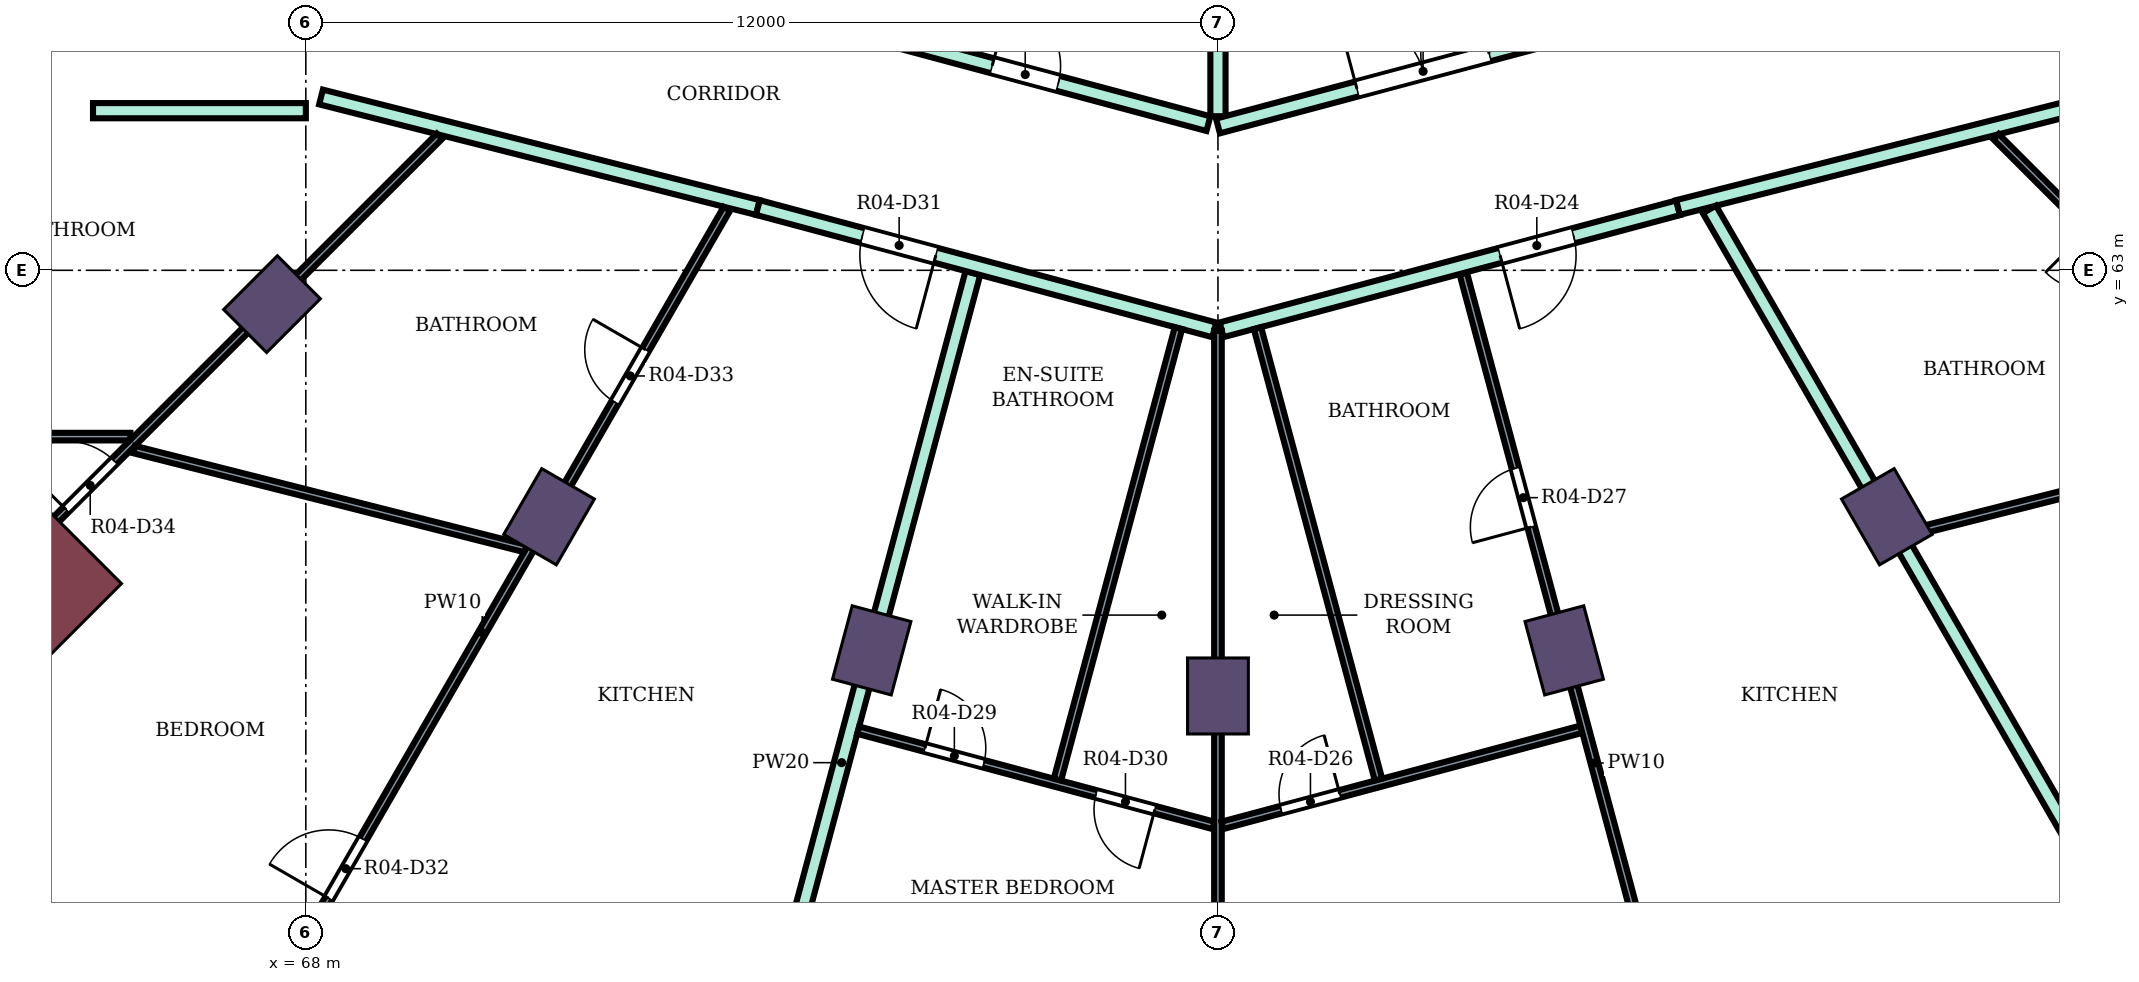
"""IFC4 building model, lengths in metres.
Left out: names, types, materials, properties, quantities, classifications, styles, units other than length and angle.
Written with IfcOpenShell. Run it as: python <this file> out.ifc"""

import sys

from ifc_helpers import new_model, si_unit, direction, frame, frame_2d, origin, origin_2d, place, context, subcontext, project, spatial, rectangle, extrude, element, fill, save


model = new_model("IFC4")
c1 = context("Model", 3, precision=1e-05, world=origin(), true_north=direction((0.0, 1.0)))
c2 = subcontext(c1, "Body", "Model", "MODEL_VIEW")
j1 = project(units=[si_unit("LENGTHUNIT", "METRE"), si_unit("PLANEANGLEUNIT", "RADIAN")], contexts=[c1])
p1 = place(None, origin())
s1 = spatial("IfcSite", under=j1, at=p1, CompositionType="ELEMENT")
p2 = place(p1, origin())
s2 = spatial("IfcBuilding", under=s1, at=p2, CompositionType="ELEMENT")
p3 = place(p2, frame((0.0, 0.0, 198.7)))
s3 = spatial("IfcBuildingStorey", under=s2, at=p3, CompositionType="ELEMENT", Elevation=198.7)
for number, where, z_axis, x_axis in (
    (1, (67.555, 62.555, 0.0), (0.0, 0.0, 1.0), (-0.707, -0.707, 0.0)),
    (2, (71.2, 59.758, 0.0), (0.0, 0.0, 1.0), (-0.5, -0.866, 0.0)),
    (3, (75.445, 58.0, 0.0), (0.0, 0.0, 1.0), (-0.259, -0.966, 0.0)),
    (4, (80.0, 57.4, 0.0), (0.0, 0.0, 1.0), (0.0, -1.0, 0.0)),
    (5, (84.555, 58.0, 0.0), (0.0, 0.0, 1.0), (0.259, -0.966, 0.0)),
    (6, (88.8, 59.758, 0.0), (0.0, 0.0, 1.0), (0.5, -0.866, 0.0)),
):
    element("IfcColumn", number, at=place(p3, frame(where, z_axis=z_axis, x_axis=x_axis)), inside=s3, PredefinedType="COLUMN", context=c2, shape_type="SweptSolid", body=[
        extrude(rectangle(XDim=1.0, YDim=0.8, at=origin_2d()), origin(), (0.0, 0.0, 1.0), 4.1),
    ])
p4 = place(p3, frame((64.09, 59.09, 0.0), z_axis=(0.0, 0.0, 1.0), x_axis=(-0.707106781187, -0.707106781187, 0.0)))
e7 = element("IfcColumn", 7, at=p4, inside=s3, PredefinedType="COLUMN", context=c2, shape_type="SweptSolid", body=[
    extrude(rectangle(XDim=1.8, YDim=2.4, at=origin_2d()), origin(), (0.0, 0.0, 1.0), 4.1),
])
p5 = place(p3, frame((65.2, 65.1, 0.0), z_axis=(0.0, 0.0, 1.0), x_axis=(1.0, 0.0, 0.0)))
e8 = element("IfcWall", 8, at=p5, inside=s3, PredefinedType="PARTITIONING", context=c2, shape_type="SweptSolid", body=[
    extrude(rectangle(XDim=2.8, YDim=0.2, at=frame_2d((1.4, 0.0))), origin(), (0.0, 0.0, 1.0), 3.65),
])
p6 = place(p3, frame((68.2, 65.28, 0.0), z_axis=(0.0, 0.0, 1.0), x_axis=(0.969450596516, -0.245286650503, 0.0)))
e9 = element("IfcWall", 9, at=p6, inside=s3, PredefinedType="PARTITIONING", context=c2, shape_type="SweptSolid", body=[
    extrude(rectangle(XDim=5.928, YDim=0.2, at=frame_2d((2.964, 0.0))), origin(), (0.0, 0.0, 1.0), 3.65),
])
p7 = place(p3, frame((73.323, 50.081, 0.0), z_axis=(0.0, 0.0, 1.0), x_axis=(0.258888262922, 0.965907276772, 0.0)))
e10 = element("IfcWall", 10, at=p7, inside=s3, PredefinedType="PARTITIONING", context=c2, shape_type="SweptSolid", body=[
    extrude(rectangle(XDim=13.338, YDim=0.2, at=frame_2d((6.669, 0.0))), origin(), (0.0, 0.0, 1.0), 3.65),
])
p8 = place(p3, frame((73.947, 63.826, 0.0), z_axis=(0.0, 0.0, 1.0), x_axis=(0.965908253407, -0.258884619088, 0.0)))
e11 = element("IfcWall", 11, at=p8, inside=s3, PredefinedType="PARTITIONING", context=c2, shape_type="SweptSolid", body=[
    extrude(rectangle(XDim=6.217, YDim=0.2, at=frame_2d((3.108, 0.0))), origin(), (0.0, 0.0, 1.0), 3.65),
])
p9 = place(p8, frame((1.424, 0.0, 0.0)))
e12 = element("IfcOpeningElement", 12, at=p9, cuts=e11, PredefinedType="OPENING", context=c2, shape_type="SweptSolid", body=[
    extrude(rectangle(XDim=1.0, YDim=2.1, at=frame_2d((0.5, 1.05))), frame((0.0, 0.11, 0.0), z_axis=(0.0, -1.0, 0.0), x_axis=(1.0, 0.0, 0.0)), (0.0, 0.0, 1.0), 0.22),
])
p10 = place(p3, frame((74.603, 66.342, 0.0), z_axis=(0.0, 0.0, 1.0), x_axis=(0.965920893652, -0.258837453254, 0.0)))
e13 = element("IfcWall", 13, at=p10, inside=s3, PredefinedType="PARTITIONING", context=c2, shape_type="SweptSolid", body=[
    extrude(rectangle(XDim=5.458, YDim=0.2, at=frame_2d((2.729, 0.0))), origin(), (0.0, 0.0, 1.0), 3.65),
])
p11 = place(p10, frame((2.512, 0.0, 0.0)))
e14 = element("IfcOpeningElement", 14, at=p11, cuts=e13, PredefinedType="OPENING", context=c2, shape_type="SweptSolid", body=[
    extrude(rectangle(XDim=0.9, YDim=2.1, at=frame_2d((0.45, 1.05))), frame((0.0, 0.11, 0.0), z_axis=(0.0, -1.0, 0.0), x_axis=(1.0, 0.0, 0.0)), (0.0, 0.0, 1.0), 0.22),
])
p12 = place(p3, frame((80.048, 62.217, 0.0), z_axis=(0.0, 0.0, 1.0), x_axis=(0.966097920642, 0.258175923996, 0.0)))
e15 = element("IfcWall", 15, at=p12, inside=s3, PredefinedType="PARTITIONING", context=c2, shape_type="SweptSolid", body=[
    extrude(rectangle(XDim=6.217, YDim=0.2, at=frame_2d((3.108, 0.0))), origin(), (0.0, 0.0, 1.0), 3.65),
])
p13 = place(p12, frame((3.792, 0.0, 0.0)))
e16 = element("IfcOpeningElement", 16, at=p13, cuts=e15, PredefinedType="OPENING", context=c2, shape_type="SweptSolid", body=[
    extrude(rectangle(XDim=1.0, YDim=2.1, at=frame_2d((0.5, 1.05))), frame((0.0, 0.11, 0.0), z_axis=(0.0, -1.0, 0.0), x_axis=(1.0, 0.0, 0.0)), (0.0, 0.0, 1.0), 0.22),
])
p14 = place(p3, frame((80.0, 65.027, 0.0), z_axis=(0.0, 0.0, 1.0), x_axis=(0.0, 1.0, 0.0)))
e17 = element("IfcWall", 17, at=p14, inside=s3, PredefinedType="PARTITIONING", context=c2, shape_type="SweptSolid", body=[
    extrude(rectangle(XDim=2.273, YDim=0.2, at=frame_2d((1.136, 0.0))), origin(), (0.0, 0.0, 1.0), 3.65),
])
p15 = place(p3, frame((80.0, 64.898, 0.0), z_axis=(0.0, 0.0, 1.0), x_axis=(0.966236923997, 0.25765520896, 0.0)))
e18 = element("IfcWall", 18, at=p15, inside=s3, PredefinedType="PARTITIONING", context=c2, shape_type="SweptSolid", body=[
    extrude(rectangle(XDim=8.168, YDim=0.2, at=frame_2d((4.084, 0.0))), origin(), (0.0, 0.0, 1.0), 3.65),
])
p16 = place(p15, frame((1.893, 0.0, 0.0)))
e19 = element("IfcOpeningElement", 19, at=p16, cuts=e18, PredefinedType="OPENING", context=c2, shape_type="SweptSolid", body=[
    extrude(rectangle(XDim=1.8, YDim=2.1, at=frame_2d((0.9, 1.05))), frame((0.0, 0.11, 0.0), z_axis=(0.0, -1.0, 0.0), x_axis=(1.0, 0.0, 0.0)), (0.0, 0.0, 1.0), 0.22),
])
p17 = place(p3, frame((86.053, 63.826, 0.0), z_axis=(0.0, 0.0, 1.0), x_axis=(0.969490004987, 0.245130843083, 0.0)))
e20 = element("IfcWall", 20, at=p17, inside=s3, PredefinedType="PARTITIONING", context=c2, shape_type="SweptSolid", body=[
    extrude(rectangle(XDim=5.908, YDim=0.2, at=frame_2d((2.954, 0.0))), origin(), (0.0, 0.0, 1.0), 3.65),
])
p18 = place(p3, frame((86.466, 63.801, 0.0), z_axis=(0.0, 0.0, 1.0), x_axis=(0.499937082171, -0.866061726362, 0.0)))
e21 = element("IfcWall", 21, at=p18, inside=s3, PredefinedType="PARTITIONING", context=c2, shape_type="SweptSolid", body=[
    extrude(rectangle(XDim=12.866, YDim=0.2, at=frame_2d((6.433, 0.0))), origin(), (0.0, 0.0, 1.0), 3.65),
])
p19 = place(p3, frame((58.6, 60.812, 0.0), z_axis=(0.0, 0.0, 1.0), x_axis=(1.0, 0.0, 0.0)))
e22 = element("IfcWall", 22, at=p19, inside=s3, PredefinedType="PARTITIONING", context=c2, shape_type="SweptSolid", body=[
    extrude(rectangle(XDim=7.092, YDim=0.1, at=frame_2d((3.546, 0.0))), origin(), (0.0, 0.0, 1.0), 3.65),
])
p20 = place(p19, frame((3.446, 0.0, 0.0)))
e23 = element("IfcOpeningElement", 23, at=p20, cuts=e22, PredefinedType="OPENING", context=c2, shape_type="SweptSolid", body=[
    extrude(rectangle(XDim=0.8, YDim=2.1, at=frame_2d((0.4, 1.05))), frame((0.0, 0.06, 0.0), z_axis=(0.0, -1.0, 0.0), x_axis=(1.0, 0.0, 0.0)), (0.0, 0.0, 1.0), 0.12),
])
p21 = place(p19, frame((0.965, 0.0, 0.0)))
e24 = element("IfcOpeningElement", 24, at=p21, cuts=e22, PredefinedType="OPENING", context=c2, shape_type="SweptSolid", body=[
    extrude(rectangle(XDim=0.8, YDim=2.1, at=frame_2d((0.4, 1.05))), frame((0.0, 0.06, 0.0), z_axis=(0.0, -1.0, 0.0), x_axis=(1.0, 0.0, 0.0)), (0.0, 0.0, 1.0), 0.12),
])
p22 = place(p3, frame((63.592, 58.6, 0.0), z_axis=(0.0, 0.0, 1.0), x_axis=(0.707260766325, 0.706952762508, 0.0)))
e25 = element("IfcWall", 25, at=p22, inside=s3, PredefinedType="PARTITIONING", context=c2, shape_type="SweptSolid", body=[
    extrude(rectangle(XDim=8.719, YDim=0.1, at=frame_2d((4.36, 0.0))), origin(), (0.0, 0.0, 1.0), 3.65),
])
p23 = place(p22, frame((1.772, 0.0, 0.0)))
e26 = element("IfcOpeningElement", 26, at=p23, cuts=e25, PredefinedType="OPENING", context=c2, shape_type="SweptSolid", body=[
    extrude(rectangle(XDim=0.9, YDim=2.1, at=frame_2d((0.45, 1.05))), frame((0.0, 0.06, 0.0), z_axis=(0.0, -1.0, 0.0), x_axis=(1.0, 0.0, 0.0)), (0.0, 0.0, 1.0), 0.12),
])
p24 = place(p3, frame((65.74, 60.642, 0.0), z_axis=(0.0, 0.0, 1.0), x_axis=(0.969435742918, -0.245345349156, 0.0)))
e27 = element("IfcWall", 27, at=p24, inside=s3, PredefinedType="PARTITIONING", context=c2, shape_type="SweptSolid", body=[
    extrude(rectangle(XDim=5.314, YDim=0.1, at=frame_2d((2.657, 0.0))), origin(), (0.0, 0.0, 1.0), 3.65),
])
p25 = place(p3, frame((67.101, 52.659, 0.0), z_axis=(0.0, 0.0, 1.0), x_axis=(0.500035926033, 0.866004660886, 0.0)))
e28 = element("IfcWall", 28, at=p25, inside=s3, PredefinedType="PARTITIONING", context=c2, shape_type="SweptSolid", body=[
    extrude(rectangle(XDim=12.876, YDim=0.1, at=frame_2d((6.438, 0.0))), origin(), (0.0, 0.0, 1.0), 3.65),
])
p26 = place(p25, frame((2.401, 0.0, 0.0)))
e29 = element("IfcOpeningElement", 29, at=p26, cuts=e28, PredefinedType="OPENING", context=c2, shape_type="SweptSolid", body=[
    extrude(rectangle(XDim=0.9, YDim=2.1, at=frame_2d((0.45, 1.05))), frame((0.0, 0.06, 0.0), z_axis=(0.0, -1.0, 0.0), x_axis=(1.0, 0.0, 0.0)), (0.0, 0.0, 1.0), 0.12),
])
p27 = place(p25, frame((9.936, 0.0, 0.0)))
e30 = element("IfcOpeningElement", 30, at=p27, cuts=e28, PredefinedType="OPENING", context=c2, shape_type="SweptSolid", body=[
    extrude(rectangle(XDim=0.8, YDim=2.1, at=frame_2d((0.4, 1.05))), frame((0.0, 0.06, 0.0), z_axis=(0.0, -1.0, 0.0), x_axis=(1.0, 0.0, 0.0)), (0.0, 0.0, 1.0), 0.12),
])
p28 = place(p3, frame((75.267, 56.95, 0.0), z_axis=(0.0, 0.0, 1.0), x_axis=(0.965900084933, -0.25891509405, 0.0)))
e31 = element("IfcWall", 31, at=p28, inside=s3, PredefinedType="PARTITIONING", context=c2, shape_type="SweptSolid", body=[
    extrude(rectangle(XDim=4.84, YDim=0.1, at=frame_2d((2.42, 0.0))), origin(), (0.0, 0.0, 1.0), 3.65),
])
p29 = place(p28, frame((0.91, 0.0, 0.0)))
e32 = element("IfcOpeningElement", 32, at=p29, cuts=e31, PredefinedType="OPENING", context=c2, shape_type="SweptSolid", body=[
    extrude(rectangle(XDim=0.8, YDim=2.1, at=frame_2d((0.4, 1.05))), frame((0.0, 0.06, 0.0), z_axis=(0.0, -1.0, 0.0), x_axis=(1.0, 0.0, 0.0)), (0.0, 0.0, 1.0), 0.12),
])
p30 = place(p28, frame((3.24, 0.0, 0.0)))
e33 = element("IfcOpeningElement", 33, at=p30, cuts=e31, PredefinedType="OPENING", context=c2, shape_type="SweptSolid", body=[
    extrude(rectangle(XDim=0.8, YDim=2.1, at=frame_2d((0.4, 1.05))), frame((0.0, 0.06, 0.0), z_axis=(0.0, -1.0, 0.0), x_axis=(1.0, 0.0, 0.0)), (0.0, 0.0, 1.0), 0.12),
])
p31 = place(p3, frame((77.888, 56.3, 0.0), z_axis=(0.0, 0.0, 1.0), x_axis=(0.258885575383, 0.965907997098, 0.0)))
e34 = element("IfcWall", 34, at=p31, inside=s3, PredefinedType="PARTITIONING", context=c2, shape_type="SweptSolid", body=[
    extrude(rectangle(XDim=6.15, YDim=0.1, at=frame_2d((3.075, 0.0))), origin(), (0.0, 0.0, 1.0), 3.65),
])
p32 = place(p3, frame((80.0, 51.8, 0.0), z_axis=(0.0, 0.0, 1.0), x_axis=(0.0, 1.0, 0.0)))
e35 = element("IfcWall", 35, at=p32, inside=s3, PredefinedType="PARTITIONING", context=c2, shape_type="SweptSolid", body=[
    extrude(rectangle(XDim=10.404, YDim=0.1, at=frame_2d((5.202, 0.0))), origin(), (0.0, 0.0, 1.0), 3.65),
])
p33 = place(p32, frame((1.666, 0.0, 0.0)))
e36 = element("IfcOpeningElement", 36, at=p33, cuts=e35, PredefinedType="OPENING", context=c2, shape_type="SweptSolid", body=[
    extrude(rectangle(XDim=0.9, YDim=2.1, at=frame_2d((0.45, 1.05))), frame((0.0, 0.06, 0.0), z_axis=(0.0, -1.0, 0.0), x_axis=(1.0, 0.0, 0.0)), (0.0, 0.0, 1.0), 0.12),
])
p34 = place(p3, frame((80.058, 55.698, 0.0), z_axis=(0.0, 0.0, 1.0), x_axis=(0.965970105839, 0.258653734992, 0.0)))
e37 = element("IfcWall", 37, at=p34, inside=s3, PredefinedType="PARTITIONING", context=c2, shape_type="SweptSolid", body=[
    extrude(rectangle(XDim=4.89, YDim=0.1, at=frame_2d((2.445, 0.0))), origin(), (0.0, 0.0, 1.0), 3.65),
])
p35 = place(p34, frame((0.8, 0.0, 0.0)))
e38 = element("IfcOpeningElement", 38, at=p35, cuts=e37, PredefinedType="OPENING", context=c2, shape_type="SweptSolid", body=[
    extrude(rectangle(XDim=0.8, YDim=2.1, at=frame_2d((0.4, 1.05))), frame((0.0, 0.06, 0.0), z_axis=(0.0, -1.0, 0.0), x_axis=(1.0, 0.0, 0.0)), (0.0, 0.0, 1.0), 0.12),
])
p36 = place(p3, frame((80.52, 62.24, 0.0), z_axis=(0.0, 0.0, 1.0), x_axis=(0.258885575383, -0.965907997098, 0.0)))
e39 = element("IfcWall", 39, at=p36, inside=s3, PredefinedType="PARTITIONING", context=c2, shape_type="SweptSolid", body=[
    extrude(rectangle(XDim=6.15, YDim=0.1, at=frame_2d((3.075, 0.0))), origin(), (0.0, 0.0, 1.0), 3.65),
])
p37 = place(p3, frame((83.228, 62.955, 0.0), z_axis=(0.0, 0.0, 1.0), x_axis=(0.258737611245, -0.965947642746, 0.0)))
e40 = element("IfcWall", 40, at=p37, inside=s3, PredefinedType="PARTITIONING", context=c2, shape_type="SweptSolid", body=[
    extrude(rectangle(XDim=13.328, YDim=0.1, at=frame_2d((6.664, 0.0))), origin(), (0.0, 0.0, 1.0), 3.65),
])
p38 = place(p37, frame((9.684, 0.0, 0.0)))
e41 = element("IfcOpeningElement", 41, at=p38, cuts=e40, PredefinedType="OPENING", context=c2, shape_type="SweptSolid", body=[
    extrude(rectangle(XDim=0.9, YDim=2.1, at=frame_2d((0.45, 1.05))), frame((0.0, 0.06, 0.0), z_axis=(0.0, -1.0, 0.0), x_axis=(1.0, 0.0, 0.0)), (0.0, 0.0, 1.0), 0.12),
])
p39 = place(p37, frame((2.65, 0.0, 0.0)))
e42 = element("IfcOpeningElement", 42, at=p39, cuts=e40, PredefinedType="OPENING", context=c2, shape_type="SweptSolid", body=[
    extrude(rectangle(XDim=0.8, YDim=2.1, at=frame_2d((0.4, 1.05))), frame((0.0, 0.06, 0.0), z_axis=(0.0, -1.0, 0.0), x_axis=(1.0, 0.0, 0.0)), (0.0, 0.0, 1.0), 0.12),
])
p40 = place(p3, frame((89.054, 59.531, 0.0), z_axis=(0.0, 0.0, 1.0), x_axis=(0.969472150829, 0.245201445279, 0.0)))
e43 = element("IfcWall", 43, at=p40, inside=s3, PredefinedType="PARTITIONING", context=c2, shape_type="SweptSolid", body=[
    extrude(rectangle(XDim=5.191, YDim=0.1, at=frame_2d((2.596, 0.0))), origin(), (0.0, 0.0, 1.0), 3.65),
])
p41 = place(p3, frame((90.236, 64.758, 0.0), z_axis=(0.0, 0.0, 1.0), x_axis=(0.706952774706, -0.707260754132, 0.0)))
e44 = element("IfcWall", 44, at=p41, inside=s3, PredefinedType="PARTITIONING", context=c2, shape_type="SweptSolid", body=[
    extrude(rectangle(XDim=8.72, YDim=0.1, at=frame_2d((4.36, 0.0))), origin(), (0.0, 0.0, 1.0), 3.65),
])
p42 = place(p41, frame((6.077, 0.0, 0.0)))
e45 = element("IfcOpeningElement", 45, at=p42, cuts=e44, PredefinedType="OPENING", context=c2, shape_type="SweptSolid", body=[
    extrude(rectangle(XDim=0.9, YDim=2.1, at=frame_2d((0.45, 1.05))), frame((0.0, 0.06, 0.0), z_axis=(0.0, -1.0, 0.0), x_axis=(1.0, 0.0, 0.0)), (0.0, 0.0, 1.0), 0.12),
])
p43 = place(p41, frame((1.722, 0.0, 0.0)))
e46 = element("IfcOpeningElement", 46, at=p43, cuts=e44, PredefinedType="OPENING", context=c2, shape_type="SweptSolid", body=[
    extrude(rectangle(XDim=0.8, YDim=2.1, at=frame_2d((0.4, 1.05))), frame((0.0, 0.06, 0.0), z_axis=(0.0, -1.0, 0.0), x_axis=(1.0, 0.0, 0.0)), (0.0, 0.0, 1.0), 0.12),
])
p44 = place(p13, frame((1.0, 0.0, 0.0), z_axis=(0.0, 0.0, 1.0), x_axis=(-1.0, 0.0, 0.0)))
e47 = element("IfcDoor", 47, at=p44, inside=s3, OperationType="SINGLE_SWING_RIGHT", PredefinedType="DOOR", context=c2, shape_type="SweptSolid", body=[
    extrude(rectangle(XDim=1.0, YDim=2.1, at=frame_2d((0.5, 1.05))), frame((0.0, 0.025, 0.0), z_axis=(0.0, -1.0, 0.0), x_axis=(1.0, 0.0, 0.0)), (0.0, 0.0, 1.0), 0.05),
])
fill(e16, e47)
p45 = place(p35, origin())
e48 = element("IfcDoor", 48, at=p45, inside=s3, OperationType="SINGLE_SWING_RIGHT", PredefinedType="DOOR", context=c2, shape_type="SweptSolid", body=[
    extrude(rectangle(XDim=0.8, YDim=2.1, at=frame_2d((0.4, 1.05))), frame((0.0, 0.025, 0.0), z_axis=(0.0, -1.0, 0.0), x_axis=(1.0, 0.0, 0.0)), (0.0, 0.0, 1.0), 0.05),
])
fill(e38, e48)
p46 = place(p39, frame((0.8, 0.0, 0.0), z_axis=(0.0, 0.0, 1.0), x_axis=(-1.0, 0.0, 0.0)))
e49 = element("IfcDoor", 49, at=p46, inside=s3, OperationType="SINGLE_SWING_LEFT", PredefinedType="DOOR", context=c2, shape_type="SweptSolid", body=[
    extrude(rectangle(XDim=0.8, YDim=2.1, at=frame_2d((0.4, 1.05))), frame((0.0, 0.025, 0.0), z_axis=(0.0, -1.0, 0.0), x_axis=(1.0, 0.0, 0.0)), (0.0, 0.0, 1.0), 0.05),
])
fill(e42, e49)
p47 = place(p29, origin())
e50 = element("IfcDoor", 50, at=p47, inside=s3, OperationType="SINGLE_SWING_LEFT", PredefinedType="DOOR", context=c2, shape_type="SweptSolid", body=[
    extrude(rectangle(XDim=0.8, YDim=2.1, at=frame_2d((0.4, 1.05))), frame((0.0, 0.025, 0.0), z_axis=(0.0, -1.0, 0.0), x_axis=(1.0, 0.0, 0.0)), (0.0, 0.0, 1.0), 0.05),
])
fill(e32, e50)
p48 = place(p30, frame((0.8, 0.0, 0.0), z_axis=(0.0, 0.0, 1.0), x_axis=(-1.0, 0.0, 0.0)))
e51 = element("IfcDoor", 51, at=p48, inside=s3, OperationType="SINGLE_SWING_LEFT", PredefinedType="DOOR", context=c2, shape_type="SweptSolid", body=[
    extrude(rectangle(XDim=0.8, YDim=2.1, at=frame_2d((0.4, 1.05))), frame((0.0, 0.025, 0.0), z_axis=(0.0, -1.0, 0.0), x_axis=(1.0, 0.0, 0.0)), (0.0, 0.0, 1.0), 0.05),
])
fill(e33, e51)
p49 = place(p9, frame((1.0, 0.0, 0.0), z_axis=(0.0, 0.0, 1.0), x_axis=(-1.0, 0.0, 0.0)))
e52 = element("IfcDoor", 52, at=p49, inside=s3, OperationType="SINGLE_SWING_LEFT", PredefinedType="DOOR", context=c2, shape_type="SweptSolid", body=[
    extrude(rectangle(XDim=1.0, YDim=2.1, at=frame_2d((0.5, 1.05))), frame((0.0, 0.025, 0.0), z_axis=(0.0, -1.0, 0.0), x_axis=(1.0, 0.0, 0.0)), (0.0, 0.0, 1.0), 0.05),
])
fill(e12, e52)
p50 = place(p26, origin())
e53 = element("IfcDoor", 53, at=p50, inside=s3, OperationType="SINGLE_SWING_LEFT", PredefinedType="DOOR", context=c2, shape_type="SweptSolid", body=[
    extrude(rectangle(XDim=0.9, YDim=2.1, at=frame_2d((0.45, 1.05))), frame((0.0, 0.025, 0.0), z_axis=(0.0, -1.0, 0.0), x_axis=(1.0, 0.0, 0.0)), (0.0, 0.0, 1.0), 0.05),
])
fill(e29, e53)
p51 = place(p27, origin())
e54 = element("IfcDoor", 54, at=p51, inside=s3, OperationType="SINGLE_SWING_RIGHT", PredefinedType="DOOR", context=c2, shape_type="SweptSolid", body=[
    extrude(rectangle(XDim=0.8, YDim=2.1, at=frame_2d((0.4, 1.05))), frame((0.0, 0.025, 0.0), z_axis=(0.0, -1.0, 0.0), x_axis=(1.0, 0.0, 0.0)), (0.0, 0.0, 1.0), 0.05),
])
fill(e30, e54)
p52 = place(p23, origin())
e55 = element("IfcDoor", 55, at=p52, inside=s3, OperationType="SINGLE_SWING_LEFT", PredefinedType="DOOR", context=c2, shape_type="SweptSolid", body=[
    extrude(rectangle(XDim=0.9, YDim=2.1, at=frame_2d((0.45, 1.05))), frame((0.0, 0.025, 0.0), z_axis=(0.0, -1.0, 0.0), x_axis=(1.0, 0.0, 0.0)), (0.0, 0.0, 1.0), 0.05),
])
fill(e26, e55)
p53 = place(p16, origin())
e56 = element("IfcDoor", 56, at=p53, inside=s3, OperationType="DOUBLE_DOOR_SINGLE_SWING", PredefinedType="DOOR", context=c2, shape_type="SweptSolid", body=[
    extrude(rectangle(XDim=1.8, YDim=2.1, at=frame_2d((0.9, 1.05))), frame((0.0, 0.025, 0.0), z_axis=(0.0, -1.0, 0.0), x_axis=(1.0, 0.0, 0.0)), (0.0, 0.0, 1.0), 0.05),
])
fill(e19, e56)
p54 = place(p11, origin())
e57 = element("IfcDoor", 57, at=p54, inside=s3, OperationType="SINGLE_SWING_LEFT", PredefinedType="DOOR", context=c2, shape_type="SweptSolid", body=[
    extrude(rectangle(XDim=0.9, YDim=2.1, at=frame_2d((0.45, 1.05))), frame((0.0, 0.025, 0.0), z_axis=(0.0, -1.0, 0.0), x_axis=(1.0, 0.0, 0.0)), (0.0, 0.0, 1.0), 0.05),
])
fill(e14, e57)
save(model, sys.argv[1])
